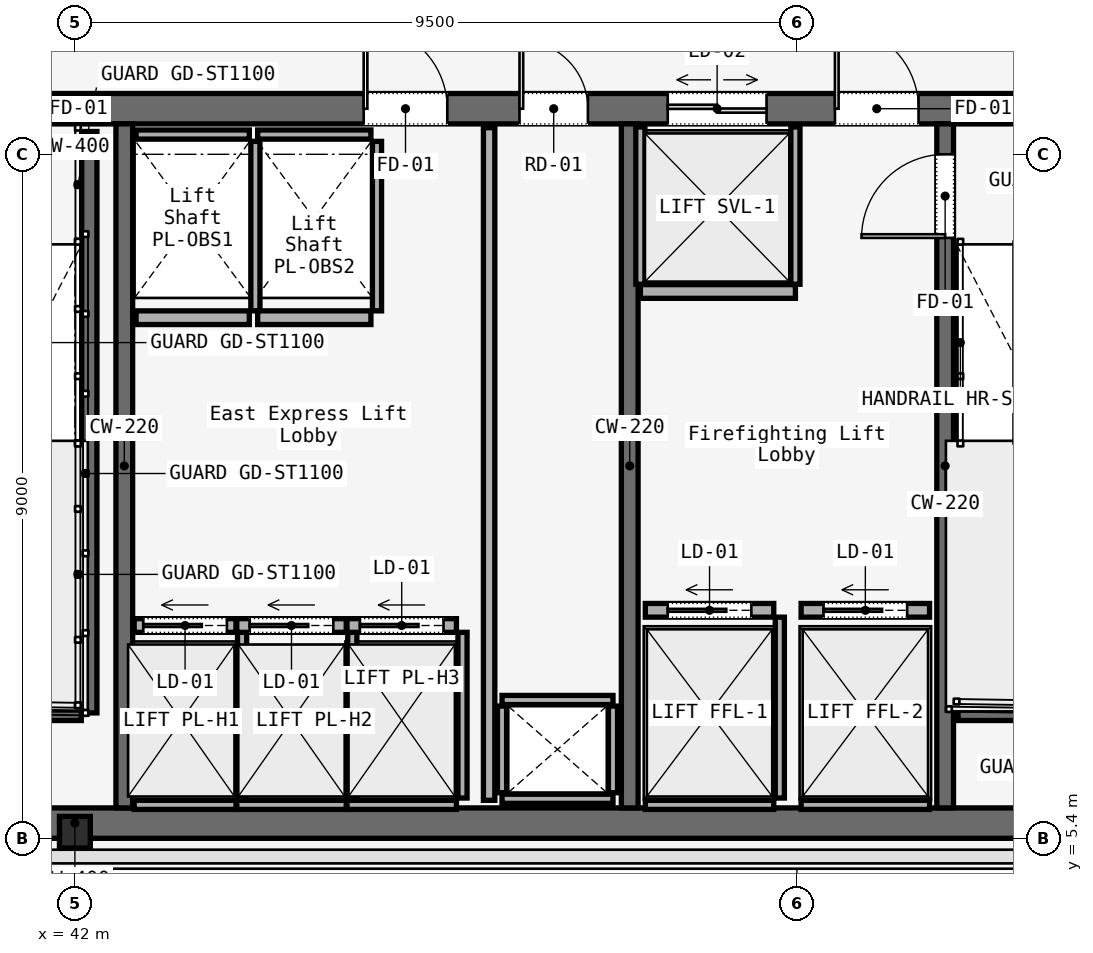
"""IFC4 building model, lengths in metres.
Left out: names, types, materials, properties, quantities, classifications, styles, units other than length and angle.
Written with IfcOpenShell. Run it as: python <this file> out.ifc"""

import sys

from ifc_helpers import new_model, si_unit, direction, frame, frame_2d, origin, origin_2d, place, context, subcontext, project, spatial, rectangle, i_section, extrude, element, fill, save


model = new_model("IFC4")
c1 = context("Model", 3, precision=1e-05, world=origin(), true_north=direction((0.0, 1.0)))
c2 = subcontext(c1, "Body", "Model", "MODEL_VIEW")
j1 = project(units=[si_unit("LENGTHUNIT", "METRE"), si_unit("PLANEANGLEUNIT", "RADIAN")], contexts=[c1])
p1 = place(None, origin())
s1 = spatial("IfcSite", under=j1, at=p1, CompositionType="ELEMENT")
p2 = place(p1, origin())
s2 = spatial("IfcBuilding", under=s1, at=p2, CompositionType="ELEMENT")
p3 = place(p2, frame((0.0, 0.0, 267.4)))
s3 = spatial("IfcBuildingStorey", under=s2, at=p3, CompositionType="ELEMENT", Elevation=267.4)
p4 = place(p3, frame((26.45, 15.0, 0.0), z_axis=(0.0, 0.0, 1.0), x_axis=(1.0, 0.0, 0.0)))
e1 = element("IfcWall", 1, at=p4, inside=s3, PredefinedType="SOLIDWALL", context=c2, shape_type="SweptSolid", body=[
    extrude(rectangle(XDim=31.1, YDim=0.4, at=frame_2d((15.55, 0.0))), origin(), (0.0, 0.0, 1.0), 3.58),
])
p5 = place(p4, frame((1.65, 0.0, 0.0)))
e2 = element("IfcOpeningElement", 2, at=p5, cuts=e1, PredefinedType="OPENING", context=c2, shape_type="SweptSolid", body=[
    extrude(rectangle(XDim=1.1, YDim=2.2, at=frame_2d((0.55, 1.1))), frame((0.0, 0.2, 0.0), z_axis=(0.0, -1.0, 0.0), x_axis=(1.0, 0.0, 0.0)), (0.0, 0.0, 1.0), 0.4),
])
p6 = place(p4, frame((13.65, 0.0, 0.0)))
e3 = element("IfcOpeningElement", 3, at=p6, cuts=e1, PredefinedType="OPENING", context=c2, shape_type="SweptSolid", body=[
    extrude(rectangle(XDim=1.1, YDim=2.2, at=frame_2d((0.55, 1.1))), frame((0.0, 0.2, 0.0), z_axis=(0.0, -1.0, 0.0), x_axis=(1.0, 0.0, 0.0)), (0.0, 0.0, 1.0), 0.4),
])
p7 = place(p4, frame((25.55, 0.0, 0.0)))
e4 = element("IfcOpeningElement", 4, at=p7, cuts=e1, PredefinedType="OPENING", context=c2, shape_type="SweptSolid", body=[
    extrude(rectangle(XDim=1.1, YDim=2.2, at=frame_2d((0.55, 1.1))), frame((0.0, 0.2, 0.0), z_axis=(0.0, -1.0, 0.0), x_axis=(1.0, 0.0, 0.0)), (0.0, 0.0, 1.0), 0.4),
])
p8 = place(p4, frame((19.35, 0.0, 0.0)))
e5 = element("IfcOpeningElement", 5, at=p8, cuts=e1, PredefinedType="OPENING", context=c2, shape_type="SweptSolid", body=[
    extrude(rectangle(XDim=1.1, YDim=2.2, at=frame_2d((0.55, 1.1))), frame((0.0, 0.2, 0.0), z_axis=(0.0, -1.0, 0.0), x_axis=(1.0, 0.0, 0.0)), (0.0, 0.0, 1.0), 0.4),
])
p9 = place(p4, frame((21.4, 0.0, 0.0)))
e6 = element("IfcOpeningElement", 6, at=p9, cuts=e1, PredefinedType="OPENING", context=c2, shape_type="SweptSolid", body=[
    extrude(rectangle(XDim=0.9, YDim=2.1, at=frame_2d((0.45, 1.05))), frame((0.0, 0.2, 0.0), z_axis=(0.0, -1.0, 0.0), x_axis=(1.0, 0.0, 0.0)), (0.0, 0.0, 1.0), 0.4),
])
p10 = place(p4, frame((6.54, 0.0, 0.0)))
e7 = element("IfcOpeningElement", 7, at=p10, cuts=e1, PredefinedType="OPENING", context=c2, shape_type="SweptSolid", body=[
    extrude(rectangle(XDim=0.95, YDim=2.2, at=frame_2d((0.475, 1.1))), frame((0.0, 0.2, 0.0), z_axis=(0.0, -1.0, 0.0), x_axis=(1.0, 0.0, 0.0)), (0.0, 0.0, 1.0), 0.4),
])
p11 = place(p4, frame((10.49, 0.0, 0.0)))
e8 = element("IfcOpeningElement", 8, at=p11, cuts=e1, PredefinedType="OPENING", context=c2, shape_type="SweptSolid", body=[
    extrude(rectangle(XDim=0.95, YDim=2.2, at=frame_2d((0.475, 1.1))), frame((0.0, 0.2, 0.0), z_axis=(0.0, -1.0, 0.0), x_axis=(1.0, 0.0, 0.0)), (0.0, 0.0, 1.0), 0.4),
])
p12 = place(p4, frame((23.35, 0.0, 0.0)))
e9 = element("IfcOpeningElement", 9, at=p12, cuts=e1, PredefinedType="OPENING", context=c2, shape_type="SweptSolid", body=[
    extrude(rectangle(XDim=1.3, YDim=2.3, at=frame_2d((0.65, 1.15))), frame((0.0, 0.2, 0.0), z_axis=(0.0, -1.0, 0.0), x_axis=(1.0, 0.0, 0.0)), (0.0, 0.0, 1.0), 0.4),
])
p13 = place(p3, frame((26.45, 5.6, 0.0), z_axis=(0.0, 0.0, 1.0), x_axis=(1.0, 0.0, 0.0)))
e10 = element("IfcWall", 10, at=p13, inside=s3, PredefinedType="SOLIDWALL", context=c2, shape_type="SweptSolid", body=[
    extrude(rectangle(XDim=31.1, YDim=0.4, at=frame_2d((15.55, 0.0))), origin(), (0.0, 0.0, 1.0), 3.58),
])
for number, where, z_axis, x_axis in (
    (11, (42.65, 5.8, 0.0), (0.0, 0.0, 1.0), (0.0, 1.0, 0.0)),
    (12, (49.3, 5.8, 0.0), (0.0, 0.0, 1.0), (0.0, 1.0, 0.0)),
):
    element("IfcWall", number, at=place(p3, frame(where, z_axis=z_axis, x_axis=x_axis)), inside=s3, PredefinedType="SOLIDWALL", context=c2, shape_type="SweptSolid", body=[
        extrude(rectangle(XDim=9.0, YDim=0.22, at=frame_2d((4.5, 0.0))), origin(), (0.0, 0.0, 1.0), 3.58),
    ])
p14 = place(p3, frame((53.45, 5.8, 0.0), z_axis=(0.0, 0.0, 1.0), x_axis=(0.0, 1.0, 0.0)))
e13 = element("IfcWall", 13, at=p14, inside=s3, PredefinedType="SOLIDWALL", context=c2, shape_type="SweptSolid", body=[
    extrude(rectangle(XDim=9.0, YDim=0.22, at=frame_2d((4.5, 0.0))), origin(), (0.0, 0.0, 1.0), 3.58),
])
p15 = place(p14, frame((7.5, 0.0, 0.0)))
e14 = element("IfcOpeningElement", 14, at=p15, cuts=e13, PredefinedType="OPENING", context=c2, shape_type="SweptSolid", body=[
    extrude(rectangle(XDim=1.1, YDim=2.2, at=frame_2d((0.55, 1.1))), frame((0.0, 0.11, 0.0), z_axis=(0.0, -1.0, 0.0), x_axis=(1.0, 0.0, 0.0)), (0.0, 0.0, 1.0), 0.22),
])
p16 = place(p3, frame((42.0, 5.48, 0.0), z_axis=(0.0, 0.0, 1.0), x_axis=(1.0, 0.0, 0.0)))
e15 = element("IfcColumn", 15, at=p16, inside=s3, PredefinedType="COLUMN", context=c2, shape_type="SweptSolid", body=[
    extrude(i_section(OverallWidth=0.406, OverallDepth=0.416, WebThickness=0.03, FlangeThickness=0.037, FilletRadius=0.015, at=origin_2d()), origin(), (0.0, 0.0, 1.0), 3.58),
])
p17 = place(p3, frame((42.19, 14.7, 0.0), z_axis=(0.0, 0.0, 1.0), x_axis=(0.0, -1.0, 0.0)))
e16 = element("IfcWall", 16, at=p17, inside=s3, PredefinedType="SOLIDWALL", context=c2, shape_type="SweptSolid", body=[
    extrude(rectangle(XDim=7.65, YDim=0.2, at=frame_2d((3.825, 0.0))), origin(), (0.0, 0.0, 1.0), 3.8),
])
for number, where, z_axis, x_axis in (
    (17, (38.97, 7.05, 0.0), (0.0, 0.0, 1.0), (1.0, 0.0, 0.0)),
    (18, (53.62, 7.05, 0.0), (0.0, 0.0, 1.0), (1.0, 0.0, 0.0)),
):
    element("IfcWall", number, at=place(p3, frame(where, z_axis=z_axis, x_axis=x_axis)), inside=s3, PredefinedType="SOLIDWALL", context=c2, shape_type="SweptSolid", body=[
        extrude(rectangle(XDim=3.115, YDim=0.2, at=frame_2d((1.558, 0.0))), origin(), (0.0, 0.0, 1.0), 3.8),
    ])
for number, where, z_axis, x_axis in (
    (19, (47.62, 5.92, 0.0), (0.0, 0.0, 1.0), (1.0, 0.0, 0.0)),
    (20, (47.62, 7.22, 0.0), (0.0, 0.0, 1.0), (1.0, 0.0, 0.0)),
):
    element("IfcWall", number, at=place(p3, frame(where, z_axis=z_axis, x_axis=x_axis)), inside=s3, PredefinedType="SOLIDWALL", context=c2, shape_type="SweptSolid", body=[
        extrude(rectangle(XDim=1.46, YDim=0.12, at=frame_2d((0.73, 0.0))), origin(), (0.0, 0.0, 1.0), 3.01),
    ])
for number, where, z_axis, x_axis in (
    (21, (47.62, 6.0, 0.0), (0.0, 0.0, 1.0), (0.0, 1.0, 0.0)),
    (22, (49.08, 6.0, 0.0), (0.0, 0.0, 1.0), (0.0, 1.0, 0.0)),
):
    element("IfcWall", number, at=place(p3, frame(where, z_axis=z_axis, x_axis=x_axis)), inside=s3, PredefinedType="SOLIDWALL", context=c2, shape_type="SweptSolid", body=[
        extrude(rectangle(XDim=1.14, YDim=0.12, at=frame_2d((0.57, 0.0))), origin(), (0.0, 0.0, 1.0), 3.01),
    ])
p18 = place(p3, frame((47.45, 5.9, 0.0), z_axis=(0.0, 0.0, 1.0), x_axis=(0.0, 1.0, 0.0)))
e23 = element("IfcWall", 23, at=p18, inside=s3, PredefinedType="PARTITIONING", context=c2, shape_type="SweptSolid", body=[
    extrude(rectangle(XDim=8.85, YDim=0.15, at=frame_2d((4.425, 0.0))), origin(), (0.0, 0.0, 1.0), 3.01),
])
p19 = place(p3, frame((42.78, 8.2, 0.0), z_axis=(0.0, 0.0, 1.0), x_axis=(1.0, 0.0, 0.0)))
e24 = element("IfcWall", 24, at=p19, inside=s3, PredefinedType="SOLIDWALL", context=c2, shape_type="SweptSolid", body=[
    extrude(rectangle(XDim=1.34, YDim=0.18, at=frame_2d((0.67, 0.0))), origin(), (0.0, 0.0, 1.0), 3.01),
])
p20 = place(p19, frame((0.12, 0.0, 0.0)))
e25 = element("IfcOpeningElement", 25, at=p20, cuts=e24, PredefinedType="OPENING", context=c2, shape_type="SweptSolid", body=[
    extrude(rectangle(XDim=1.1, YDim=2.2, at=frame_2d((0.55, 1.1))), frame((0.0, 0.09, 0.0), z_axis=(0.0, -1.0, 0.0), x_axis=(1.0, 0.0, 0.0)), (0.0, 0.0, 1.0), 0.18),
])
p21 = place(p3, frame((42.78, 5.84, 0.0), z_axis=(0.0, 0.0, 1.0), x_axis=(1.0, 0.0, 0.0)))
e26 = element("IfcWall", 26, at=p21, inside=s3, PredefinedType="SOLIDWALL", context=c2, shape_type="SweptSolid", body=[
    extrude(rectangle(XDim=1.34, YDim=0.12, at=frame_2d((0.67, 0.0))), origin(), (0.0, 0.0, 1.0), 3.01),
])
p22 = place(p3, frame((44.2, 5.93, 0.0), z_axis=(0.0, 0.0, 1.0), x_axis=(0.0, 1.0, 0.0)))
e27 = element("IfcWall", 27, at=p22, inside=s3, PredefinedType="SOLIDWALL", context=c2, shape_type="SweptSolid", body=[
    extrude(rectangle(XDim=2.18, YDim=0.12, at=frame_2d((1.09, 0.0))), origin(), (0.0, 0.0, 1.0), 3.01),
])
p23 = place(p3, frame((44.13, 8.2, 0.0), z_axis=(0.0, 0.0, 1.0), x_axis=(1.0, 0.0, 0.0)))
e28 = element("IfcWall", 28, at=p23, inside=s3, PredefinedType="SOLIDWALL", context=c2, shape_type="SweptSolid", body=[
    extrude(rectangle(XDim=1.44, YDim=0.18, at=frame_2d((0.72, 0.0))), origin(), (0.0, 0.0, 1.0), 3.01),
])
p24 = place(p23, frame((0.17, 0.0, 0.0)))
e29 = element("IfcOpeningElement", 29, at=p24, cuts=e28, PredefinedType="OPENING", context=c2, shape_type="SweptSolid", body=[
    extrude(rectangle(XDim=1.1, YDim=2.2, at=frame_2d((0.55, 1.1))), frame((0.0, 0.09, 0.0), z_axis=(0.0, -1.0, 0.0), x_axis=(1.0, 0.0, 0.0)), (0.0, 0.0, 1.0), 0.18),
])
p25 = place(p3, frame((44.13, 5.84, 0.0), z_axis=(0.0, 0.0, 1.0), x_axis=(1.0, 0.0, 0.0)))
e30 = element("IfcWall", 30, at=p25, inside=s3, PredefinedType="SOLIDWALL", context=c2, shape_type="SweptSolid", body=[
    extrude(rectangle(XDim=1.44, YDim=0.12, at=frame_2d((0.72, 0.0))), origin(), (0.0, 0.0, 1.0), 3.01),
])
p26 = place(p3, frame((45.65, 5.93, 0.0), z_axis=(0.0, 0.0, 1.0), x_axis=(0.0, 1.0, 0.0)))
e31 = element("IfcWall", 31, at=p26, inside=s3, PredefinedType="SOLIDWALL", context=c2, shape_type="SweptSolid", body=[
    extrude(rectangle(XDim=2.18, YDim=0.12, at=frame_2d((1.09, 0.0))), origin(), (0.0, 0.0, 1.0), 3.01),
])
p27 = place(p3, frame((45.58, 8.2, 0.0), z_axis=(0.0, 0.0, 1.0), x_axis=(1.0, 0.0, 0.0)))
e32 = element("IfcWall", 32, at=p27, inside=s3, PredefinedType="SOLIDWALL", context=c2, shape_type="SweptSolid", body=[
    extrude(rectangle(XDim=1.44, YDim=0.18, at=frame_2d((0.72, 0.0))), origin(), (0.0, 0.0, 1.0), 3.01),
])
p28 = place(p27, frame((0.17, 0.0, 0.0)))
e33 = element("IfcOpeningElement", 33, at=p28, cuts=e32, PredefinedType="OPENING", context=c2, shape_type="SweptSolid", body=[
    extrude(rectangle(XDim=1.1, YDim=2.2, at=frame_2d((0.55, 1.1))), frame((0.0, 0.09, 0.0), z_axis=(0.0, -1.0, 0.0), x_axis=(1.0, 0.0, 0.0)), (0.0, 0.0, 1.0), 0.18),
])
p29 = place(p3, frame((45.58, 5.84, 0.0), z_axis=(0.0, 0.0, 1.0), x_axis=(1.0, 0.0, 0.0)))
e34 = element("IfcWall", 34, at=p29, inside=s3, PredefinedType="SOLIDWALL", context=c2, shape_type="SweptSolid", body=[
    extrude(rectangle(XDim=1.44, YDim=0.12, at=frame_2d((0.72, 0.0))), origin(), (0.0, 0.0, 1.0), 3.01),
])
p30 = place(p3, frame((47.1, 5.93, 0.0), z_axis=(0.0, 0.0, 1.0), x_axis=(0.0, 1.0, 0.0)))
e35 = element("IfcWall", 35, at=p30, inside=s3, PredefinedType="SOLIDWALL", context=c2, shape_type="SweptSolid", body=[
    extrude(rectangle(XDim=2.18, YDim=0.12, at=frame_2d((1.09, 0.0))), origin(), (0.0, 0.0, 1.0), 3.01),
])
p31 = place(p3, frame((42.805, 12.25, 0.0), z_axis=(0.0, 0.0, 1.0), x_axis=(1.0, 0.0, 0.0)))
e36 = element("IfcWall", 36, at=p31, inside=s3, PredefinedType="SOLIDWALL", context=c2, shape_type="SweptSolid", body=[
    extrude(rectangle(XDim=1.49, YDim=0.18, at=frame_2d((0.745, 0.0))), origin(), (0.0, 0.0, 1.0), 3.01),
])
p32 = place(p3, frame((42.805, 14.66, 0.0), z_axis=(0.0, 0.0, 1.0), x_axis=(1.0, 0.0, 0.0)))
e37 = element("IfcWall", 37, at=p32, inside=s3, PredefinedType="SOLIDWALL", context=c2, shape_type="SweptSolid", body=[
    extrude(rectangle(XDim=1.49, YDim=0.12, at=frame_2d((0.745, 0.0))), origin(), (0.0, 0.0, 1.0), 3.01),
])
p33 = place(p3, frame((44.375, 12.34, 0.0), z_axis=(0.0, 0.0, 1.0), x_axis=(0.0, 1.0, 0.0)))
e38 = element("IfcWall", 38, at=p33, inside=s3, PredefinedType="SOLIDWALL", context=c2, shape_type="SweptSolid", body=[
    extrude(rectangle(XDim=2.23, YDim=0.12, at=frame_2d((1.115, 0.0))), origin(), (0.0, 0.0, 1.0), 3.01),
])
p34 = place(p3, frame((44.405, 12.25, 0.0), z_axis=(0.0, 0.0, 1.0), x_axis=(1.0, 0.0, 0.0)))
e39 = element("IfcWall", 39, at=p34, inside=s3, PredefinedType="SOLIDWALL", context=c2, shape_type="SweptSolid", body=[
    extrude(rectangle(XDim=1.49, YDim=0.18, at=frame_2d((0.745, 0.0))), origin(), (0.0, 0.0, 1.0), 3.01),
])
p35 = place(p3, frame((44.405, 14.66, 0.0), z_axis=(0.0, 0.0, 1.0), x_axis=(1.0, 0.0, 0.0)))
e40 = element("IfcWall", 40, at=p35, inside=s3, PredefinedType="SOLIDWALL", context=c2, shape_type="SweptSolid", body=[
    extrude(rectangle(XDim=1.49, YDim=0.12, at=frame_2d((0.745, 0.0))), origin(), (0.0, 0.0, 1.0), 3.01),
])
p36 = place(p3, frame((45.975, 12.34, 0.0), z_axis=(0.0, 0.0, 1.0), x_axis=(0.0, 1.0, 0.0)))
e41 = element("IfcWall", 41, at=p36, inside=s3, PredefinedType="SOLIDWALL", context=c2, shape_type="SweptSolid", body=[
    extrude(rectangle(XDim=2.23, YDim=0.12, at=frame_2d((1.115, 0.0))), origin(), (0.0, 0.0, 1.0), 3.01),
])
p37 = place(p3, frame((49.505, 8.4, 0.0), z_axis=(0.0, 0.0, 1.0), x_axis=(1.0, 0.0, 0.0)))
e42 = element("IfcWall", 42, at=p37, inside=s3, PredefinedType="SOLIDWALL", context=c2, shape_type="SweptSolid", body=[
    extrude(rectangle(XDim=1.69, YDim=0.18, at=frame_2d((0.845, 0.0))), origin(), (0.0, 0.0, 1.0), 3.01),
])
p38 = place(p37, frame((0.295, 0.0, 0.0)))
e43 = element("IfcOpeningElement", 43, at=p38, cuts=e42, PredefinedType="OPENING", context=c2, shape_type="SweptSolid", body=[
    extrude(rectangle(XDim=1.1, YDim=2.2, at=frame_2d((0.55, 1.1))), frame((0.0, 0.09, 0.0), z_axis=(0.0, -1.0, 0.0), x_axis=(1.0, 0.0, 0.0)), (0.0, 0.0, 1.0), 0.18),
])
p39 = place(p3, frame((49.505, 5.84, 0.0), z_axis=(0.0, 0.0, 1.0), x_axis=(1.0, 0.0, 0.0)))
e44 = element("IfcWall", 44, at=p39, inside=s3, PredefinedType="SOLIDWALL", context=c2, shape_type="SweptSolid", body=[
    extrude(rectangle(XDim=1.69, YDim=0.12, at=frame_2d((0.845, 0.0))), origin(), (0.0, 0.0, 1.0), 3.01),
])
p40 = place(p3, frame((51.275, 5.93, 0.0), z_axis=(0.0, 0.0, 1.0), x_axis=(0.0, 1.0, 0.0)))
e45 = element("IfcWall", 45, at=p40, inside=s3, PredefinedType="SOLIDWALL", context=c2, shape_type="SweptSolid", body=[
    extrude(rectangle(XDim=2.38, YDim=0.12, at=frame_2d((1.19, 0.0))), origin(), (0.0, 0.0, 1.0), 3.01),
])
p41 = place(p3, frame((51.555, 8.4, 0.0), z_axis=(0.0, 0.0, 1.0), x_axis=(1.0, 0.0, 0.0)))
e46 = element("IfcWall", 46, at=p41, inside=s3, PredefinedType="SOLIDWALL", context=c2, shape_type="SweptSolid", body=[
    extrude(rectangle(XDim=1.69, YDim=0.18, at=frame_2d((0.845, 0.0))), origin(), (0.0, 0.0, 1.0), 3.01),
])
p42 = place(p41, frame((0.295, 0.0, 0.0)))
e47 = element("IfcOpeningElement", 47, at=p42, cuts=e46, PredefinedType="OPENING", context=c2, shape_type="SweptSolid", body=[
    extrude(rectangle(XDim=1.1, YDim=2.2, at=frame_2d((0.55, 1.1))), frame((0.0, 0.09, 0.0), z_axis=(0.0, -1.0, 0.0), x_axis=(1.0, 0.0, 0.0)), (0.0, 0.0, 1.0), 0.18),
])
p43 = place(p3, frame((51.555, 5.84, 0.0), z_axis=(0.0, 0.0, 1.0), x_axis=(1.0, 0.0, 0.0)))
e48 = element("IfcWall", 48, at=p43, inside=s3, PredefinedType="SOLIDWALL", context=c2, shape_type="SweptSolid", body=[
    extrude(rectangle(XDim=1.69, YDim=0.12, at=frame_2d((0.845, 0.0))), origin(), (0.0, 0.0, 1.0), 3.01),
])
p44 = place(p3, frame((49.44, 12.595, 0.0), z_axis=(0.0, 0.0, 1.0), x_axis=(1.0, 0.0, 0.0)))
e49 = element("IfcWall", 49, at=p44, inside=s3, PredefinedType="SOLIDWALL", context=c2, shape_type="SweptSolid", body=[
    extrude(rectangle(XDim=2.04, YDim=0.18, at=frame_2d((1.02, 0.0))), origin(), (0.0, 0.0, 1.0), 3.01),
])
for number, where, z_axis, x_axis in (
    (50, (49.44, 12.69, 0.0), (0.0, 0.0, 1.0), (0.0, 1.0, 0.0)),
    (51, (51.48, 12.69, 0.0), (0.0, 0.0, 1.0), (0.0, 1.0, 0.0)),
):
    element("IfcWall", number, at=place(p3, frame(where, z_axis=z_axis, x_axis=x_axis)), inside=s3, PredefinedType="SOLIDWALL", context=c2, shape_type="SweptSolid", body=[
        extrude(rectangle(XDim=2.07, YDim=0.12, at=frame_2d((1.035, 0.0))), origin(), (0.0, 0.0, 1.0), 3.01),
    ])
p45 = place(p7, origin())
e52 = element("IfcDoor", 52, at=p45, inside=s3, OperationType="SINGLE_SWING_RIGHT", PredefinedType="DOOR", context=c2, shape_type="SweptSolid", body=[
    extrude(rectangle(XDim=1.1, YDim=2.2, at=frame_2d((0.55, 1.1))), frame((0.0, 0.025, 0.0), z_axis=(0.0, -1.0, 0.0), x_axis=(1.0, 0.0, 0.0)), (0.0, 0.0, 1.0), 0.05),
])
fill(e4, e52)
p46 = place(p8, origin())
e53 = element("IfcDoor", 53, at=p46, inside=s3, OperationType="SINGLE_SWING_LEFT", PredefinedType="DOOR", context=c2, shape_type="SweptSolid", body=[
    extrude(rectangle(XDim=1.1, YDim=2.2, at=frame_2d((0.55, 1.1))), frame((0.0, 0.025, 0.0), z_axis=(0.0, -1.0, 0.0), x_axis=(1.0, 0.0, 0.0)), (0.0, 0.0, 1.0), 0.05),
])
fill(e5, e53)
p47 = place(p9, origin())
e54 = element("IfcDoor", 54, at=p47, inside=s3, OperationType="SINGLE_SWING_LEFT", PredefinedType="DOOR", context=c2, shape_type="SweptSolid", body=[
    extrude(rectangle(XDim=0.9, YDim=2.1, at=frame_2d((0.45, 1.05))), frame((0.0, 0.025, 0.0), z_axis=(0.0, -1.0, 0.0), x_axis=(1.0, 0.0, 0.0)), (0.0, 0.0, 1.0), 0.05),
])
fill(e6, e54)
p48 = place(p15, origin())
e55 = element("IfcDoor", 55, at=p48, inside=s3, OperationType="SINGLE_SWING_LEFT", PredefinedType="DOOR", context=c2, shape_type="SweptSolid", body=[
    extrude(rectangle(XDim=1.1, YDim=2.2, at=frame_2d((0.55, 1.1))), frame((0.0, 0.025, 0.0), z_axis=(0.0, -1.0, 0.0), x_axis=(1.0, 0.0, 0.0)), (0.0, 0.0, 1.0), 0.05),
])
fill(e14, e55)
p49 = place(p20, origin())
e56 = element("IfcDoor", 56, at=p49, inside=s3, OperationType="SLIDING_TO_LEFT", PredefinedType="DOOR", context=c2, shape_type="SweptSolid", body=[
    extrude(rectangle(XDim=1.1, YDim=2.2, at=frame_2d((0.55, 1.1))), frame((0.0, 0.025, 0.0), z_axis=(0.0, -1.0, 0.0), x_axis=(1.0, 0.0, 0.0)), (0.0, 0.0, 1.0), 0.05),
])
fill(e25, e56)
p50 = place(p24, origin())
e57 = element("IfcDoor", 57, at=p50, inside=s3, OperationType="SLIDING_TO_LEFT", PredefinedType="DOOR", context=c2, shape_type="SweptSolid", body=[
    extrude(rectangle(XDim=1.1, YDim=2.2, at=frame_2d((0.55, 1.1))), frame((0.0, 0.025, 0.0), z_axis=(0.0, -1.0, 0.0), x_axis=(1.0, 0.0, 0.0)), (0.0, 0.0, 1.0), 0.05),
])
fill(e29, e57)
p51 = place(p28, origin())
e58 = element("IfcDoor", 58, at=p51, inside=s3, OperationType="SLIDING_TO_LEFT", PredefinedType="DOOR", context=c2, shape_type="SweptSolid", body=[
    extrude(rectangle(XDim=1.1, YDim=2.2, at=frame_2d((0.55, 1.1))), frame((0.0, 0.025, 0.0), z_axis=(0.0, -1.0, 0.0), x_axis=(1.0, 0.0, 0.0)), (0.0, 0.0, 1.0), 0.05),
])
fill(e33, e58)
p52 = place(p38, origin())
e59 = element("IfcDoor", 59, at=p52, inside=s3, OperationType="SLIDING_TO_LEFT", PredefinedType="DOOR", context=c2, shape_type="SweptSolid", body=[
    extrude(rectangle(XDim=1.1, YDim=2.2, at=frame_2d((0.55, 1.1))), frame((0.0, 0.025, 0.0), z_axis=(0.0, -1.0, 0.0), x_axis=(1.0, 0.0, 0.0)), (0.0, 0.0, 1.0), 0.05),
])
fill(e43, e59)
p53 = place(p42, origin())
e60 = element("IfcDoor", 60, at=p53, inside=s3, OperationType="SLIDING_TO_LEFT", PredefinedType="DOOR", context=c2, shape_type="SweptSolid", body=[
    extrude(rectangle(XDim=1.1, YDim=2.2, at=frame_2d((0.55, 1.1))), frame((0.0, 0.025, 0.0), z_axis=(0.0, -1.0, 0.0), x_axis=(1.0, 0.0, 0.0)), (0.0, 0.0, 1.0), 0.05),
])
fill(e47, e60)
p54 = place(p12, origin())
e61 = element("IfcDoor", 61, at=p54, inside=s3, OperationType="DOUBLE_DOOR_SLIDING", PredefinedType="DOOR", context=c2, shape_type="SweptSolid", body=[
    extrude(rectangle(XDim=1.3, YDim=2.3, at=frame_2d((0.65, 1.15))), frame((0.0, 0.025, 0.0), z_axis=(0.0, -1.0, 0.0), x_axis=(1.0, 0.0, 0.0)), (0.0, 0.0, 1.0), 0.05),
])
fill(e9, e61)
save(model, sys.argv[1])
